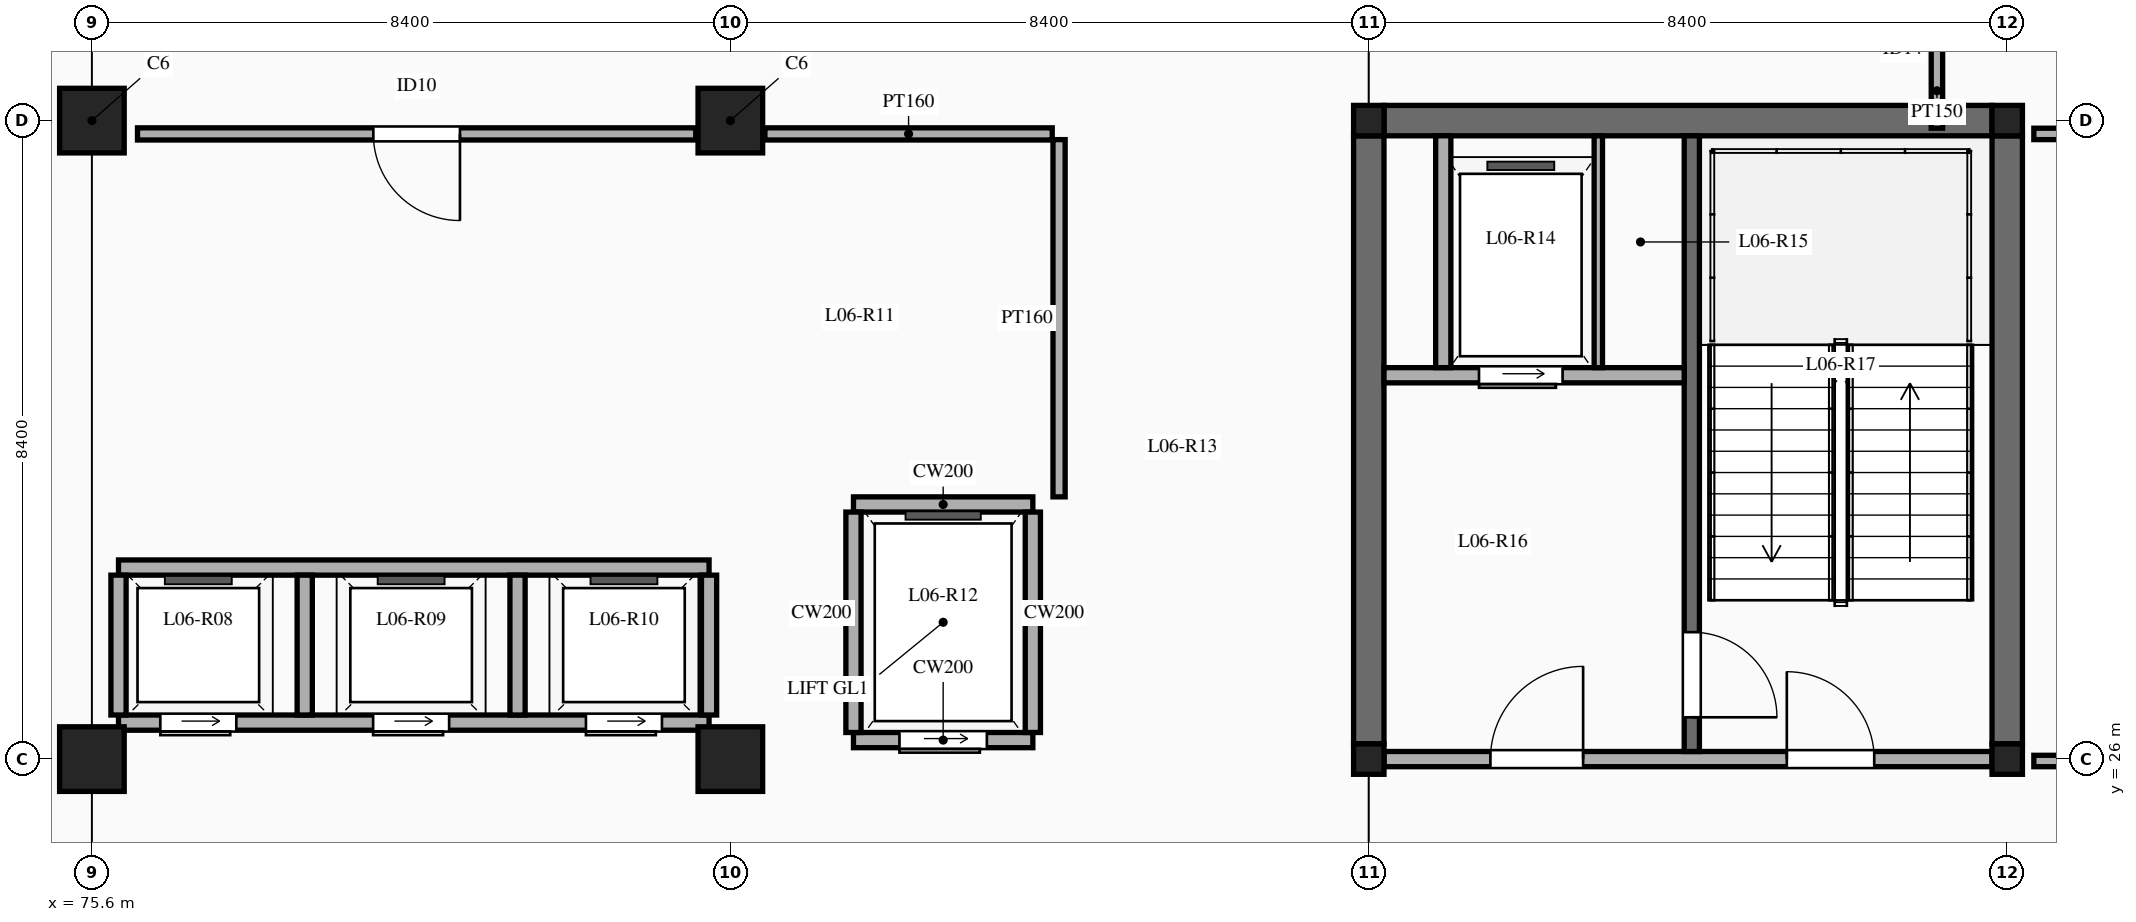
"""IFC4 building model, lengths in metres.
Left out: names, types, materials, properties, quantities, classifications, styles, units other than length and angle.
Written with IfcOpenShell. Run it as: python <this file> out.ifc"""

import sys

from ifc_helpers import new_model, si_unit, direction, frame, frame_2d, origin, origin_2d, place, context, subcontext, project, spatial, rectangle, extrude, element, fill, save


model = new_model("IFC4")
c1 = context("Model", 3, precision=1e-05, world=origin(), true_north=direction((0.0, 1.0)))
c2 = subcontext(c1, "Body", "Model", "MODEL_VIEW")
j1 = project(units=[si_unit("LENGTHUNIT", "METRE"), si_unit("PLANEANGLEUNIT", "RADIAN")], contexts=[c1])
p1 = place(None, origin())
s1 = spatial("IfcSite", under=j1, at=p1, CompositionType="ELEMENT")
p2 = place(p1, origin())
s2 = spatial("IfcBuilding", under=s1, at=p2, CompositionType="ELEMENT")
p3 = place(p2, frame((0.0, 0.0, 28.5)))
s3 = spatial("IfcBuildingStorey", under=s2, at=p3, CompositionType="ELEMENT", Elevation=28.5)
for number, where, z_axis, x_axis in (
    (1, (75.6, 26.0, 0.0), (0.0, 0.0, 1.0), (1.0, 0.0, 0.0)),
    (2, (75.6, 34.4, 0.0), (0.0, 0.0, 1.0), (1.0, 0.0, 0.0)),
    (3, (84.0, 26.0, 0.0), (0.0, 0.0, 1.0), (1.0, 0.0, 0.0)),
    (4, (84.0, 34.4, 0.0), (0.0, 0.0, 1.0), (1.0, 0.0, 0.0)),
):
    element("IfcColumn", number, at=place(p3, frame(where, z_axis=z_axis, x_axis=x_axis)), inside=s3, PredefinedType="COLUMN", context=c2, shape_type="SweptSolid", body=[
        extrude(rectangle(XDim=0.85, YDim=0.85, at=origin_2d()), origin(), (0.0, 0.0, 1.0), 4.5),
    ])
for number, where, z_axis, x_axis in (
    (5, (92.4, 26.0, 0.0), (0.0, 0.0, 1.0), (1.0, 0.0, 0.0)),
    (6, (92.4, 34.4, 0.0), (0.0, 0.0, 1.0), (1.0, 0.0, 0.0)),
    (7, (100.8, 26.0, 0.0), (0.0, 0.0, 1.0), (1.0, 0.0, 0.0)),
    (8, (100.8, 34.4, 0.0), (0.0, 0.0, 1.0), (1.0, 0.0, 0.0)),
):
    element("IfcColumn", number, at=place(p3, frame(where, z_axis=z_axis, x_axis=x_axis)), inside=s3, PredefinedType="COLUMN", context=c2, shape_type="SweptSolid", body=[
        extrude(rectangle(XDim=0.4, YDim=0.4, at=origin_2d()), origin(), (0.0, 0.0, 1.0), 4.5),
    ])
for number, where, z_axis, x_axis in (
    (9, (92.4, 26.2, 0.0), (0.0, 0.0, 1.0), (0.0, 1.0, 0.0)),
    (10, (100.8, 26.2, 0.0), (0.0, 0.0, 1.0), (0.0, 1.0, 0.0)),
    (11, (92.6, 34.4, 0.0), (0.0, 0.0, 1.0), (1.0, 0.0, 0.0)),
):
    element("IfcWall", number, at=place(p3, frame(where, z_axis=z_axis, x_axis=x_axis)), inside=s3, PredefinedType="SHEAR", context=c2, shape_type="SweptSolid", body=[
        extrude(rectangle(XDim=8.0, YDim=0.4, at=frame_2d((4.0, 0.0))), origin(), (0.0, 0.0, 1.0), 4.5),
    ])
p4 = place(p3, frame((92.6, 26.0, 0.0), z_axis=(0.0, 0.0, 1.0), x_axis=(1.0, 0.0, 0.0)))
e12 = element("IfcWall", 12, at=p4, inside=s3, PredefinedType="SOLIDWALL", context=c2, shape_type="SweptSolid", body=[
    extrude(rectangle(XDim=8.0, YDim=0.2, at=frame_2d((4.0, 0.0))), origin(), (0.0, 0.0, 1.0), 3.78),
])
p5 = place(p4, frame((1.4, 0.0, 0.0)))
e13 = element("IfcOpeningElement", 13, at=p5, cuts=e12, PredefinedType="OPENING", context=c2, shape_type="SweptSolid", body=[
    extrude(rectangle(XDim=1.22, YDim=2.15, at=frame_2d((0.61, 1.075))), frame((0.0, 0.11, 0.0), z_axis=(0.0, -1.0, 0.0), x_axis=(1.0, 0.0, 0.0)), (0.0, 0.0, 1.0), 0.22),
])
p6 = place(p4, frame((5.3, 0.0, 0.0)))
e14 = element("IfcOpeningElement", 14, at=p6, cuts=e12, PredefinedType="OPENING", context=c2, shape_type="SweptSolid", body=[
    extrude(rectangle(XDim=1.15, YDim=2.15, at=frame_2d((0.575, 1.075))), frame((0.0, 0.11, 0.0), z_axis=(0.0, -1.0, 0.0), x_axis=(1.0, 0.0, 0.0)), (0.0, 0.0, 1.0), 0.22),
])
p7 = place(p3, frame((96.65, 26.1, 0.0), z_axis=(0.0, 0.0, 1.0), x_axis=(0.0, 1.0, 0.0)))
e15 = element("IfcWall", 15, at=p7, inside=s3, PredefinedType="SOLIDWALL", context=c2, shape_type="SweptSolid", body=[
    extrude(rectangle(XDim=8.1, YDim=0.2, at=frame_2d((4.05, 0.0))), origin(), (0.0, 0.0, 1.0), 4.3),
])
p8 = place(p7, frame((0.45, 0.0, 0.0)))
e16 = element("IfcOpeningElement", 16, at=p8, cuts=e15, PredefinedType="OPENING", context=c2, shape_type="SweptSolid", body=[
    extrude(rectangle(XDim=1.12, YDim=2.15, at=frame_2d((0.56, 1.075))), frame((0.0, 0.11, 0.0), z_axis=(0.0, -1.0, 0.0), x_axis=(1.0, 0.0, 0.0)), (0.0, 0.0, 1.0), 0.22),
])
p9 = place(p3, frame((92.6, 31.05, 0.0), z_axis=(0.0, 0.0, 1.0), x_axis=(1.0, 0.0, 0.0)))
e17 = element("IfcWall", 17, at=p9, inside=s3, PredefinedType="SOLIDWALL", context=c2, shape_type="SweptSolid", body=[
    extrude(rectangle(XDim=3.95, YDim=0.2, at=frame_2d((1.975, 0.0))), origin(), (0.0, 0.0, 1.0), 4.3),
])
p10 = place(p9, frame((1.25, 0.0, 0.0)))
e18 = element("IfcOpeningElement", 18, at=p10, cuts=e17, PredefinedType="OPENING", context=c2, shape_type="SweptSolid", body=[
    extrude(rectangle(XDim=1.1, YDim=2.15, at=frame_2d((0.55, 1.075))), frame((0.0, 0.11, 0.0), z_axis=(0.0, -1.0, 0.0), x_axis=(1.0, 0.0, 0.0)), (0.0, 0.0, 1.0), 0.22),
])
p11 = place(p3, frame((95.42, 31.15, 0.0), z_axis=(0.0, 0.0, 1.0), x_axis=(0.0, 1.0, 0.0)))
e19 = element("IfcWall", 19, at=p11, inside=s3, PredefinedType="PARTITIONING", context=c2, shape_type="SweptSolid", body=[
    extrude(rectangle(XDim=3.05, YDim=0.11, at=frame_2d((1.525, 0.0))), origin(), (0.0, 0.0, 1.0), 4.3),
])
p12 = place(p3, frame((93.38, 31.15, 0.0), z_axis=(0.0, 0.0, 1.0), x_axis=(0.0, 1.0, 0.0)))
e20 = element("IfcWall", 20, at=p12, inside=s3, PredefinedType="SOLIDWALL", context=c2, shape_type="SweptSolid", body=[
    extrude(rectangle(XDim=3.05, YDim=0.2, at=frame_2d((1.525, 0.0))), origin(), (0.0, 0.0, 1.0), 4.3),
])
p13 = place(p3, frame((75.95, 26.48, 0.0), z_axis=(0.0, 0.0, 1.0), x_axis=(1.0, 0.0, 0.0)))
e21 = element("IfcWall", 21, at=p13, inside=s3, PredefinedType="SOLIDWALL", context=c2, shape_type="SweptSolid", body=[
    extrude(rectangle(XDim=7.77, YDim=0.2, at=frame_2d((3.885, 0.0))), origin(), (0.0, 0.0, 1.0), 4.3),
])
p14 = place(p13, frame((0.55, 0.0, 0.0)))
e22 = element("IfcOpeningElement", 22, at=p14, cuts=e21, PredefinedType="OPENING", context=c2, shape_type="SweptSolid", body=[
    extrude(rectangle(XDim=1.0, YDim=2.15, at=frame_2d((0.5, 1.075))), frame((0.0, 0.11, 0.0), z_axis=(0.0, -1.0, 0.0), x_axis=(1.0, 0.0, 0.0)), (0.0, 0.0, 1.0), 0.22),
])
p15 = place(p13, frame((3.35, 0.0, 0.0)))
e23 = element("IfcOpeningElement", 23, at=p15, cuts=e21, PredefinedType="OPENING", context=c2, shape_type="SweptSolid", body=[
    extrude(rectangle(XDim=1.0, YDim=2.15, at=frame_2d((0.5, 1.075))), frame((0.0, 0.11, 0.0), z_axis=(0.0, -1.0, 0.0), x_axis=(1.0, 0.0, 0.0)), (0.0, 0.0, 1.0), 0.22),
])
p16 = place(p13, frame((6.15, 0.0, 0.0)))
e24 = element("IfcOpeningElement", 24, at=p16, cuts=e21, PredefinedType="OPENING", context=c2, shape_type="SweptSolid", body=[
    extrude(rectangle(XDim=1.0, YDim=2.15, at=frame_2d((0.5, 1.075))), frame((0.0, 0.11, 0.0), z_axis=(0.0, -1.0, 0.0), x_axis=(1.0, 0.0, 0.0)), (0.0, 0.0, 1.0), 0.22),
])
p17 = place(p3, frame((75.95, 28.52, 0.0), z_axis=(0.0, 0.0, 1.0), x_axis=(1.0, 0.0, 0.0)))
e25 = element("IfcWall", 25, at=p17, inside=s3, PredefinedType="SOLIDWALL", context=c2, shape_type="SweptSolid", body=[
    extrude(rectangle(XDim=7.77, YDim=0.2, at=frame_2d((3.885, 0.0))), origin(), (0.0, 0.0, 1.0), 4.3),
])
p18 = place(p3, frame((75.95, 26.58, 0.0), z_axis=(0.0, 0.0, 1.0), x_axis=(0.0, 1.0, 0.0)))
e26 = element("IfcWall", 26, at=p18, inside=s3, PredefinedType="SOLIDWALL", context=c2, shape_type="SweptSolid", body=[
    extrude(rectangle(XDim=1.84, YDim=0.2, at=frame_2d((0.92, 0.0))), origin(), (0.0, 0.0, 1.0), 3.88),
])
for number, where, z_axis, x_axis in (
    (27, (78.4, 26.58, 0.0), (0.0, 0.0, 1.0), (0.0, 1.0, 0.0)),
    (28, (81.2, 26.58, 0.0), (0.0, 0.0, 1.0), (0.0, 1.0, 0.0)),
):
    element("IfcWall", number, at=place(p3, frame(where, z_axis=z_axis, x_axis=x_axis)), inside=s3, PredefinedType="SOLIDWALL", context=c2, shape_type="SweptSolid", body=[
        extrude(rectangle(XDim=1.84, YDim=0.2, at=frame_2d((0.92, 0.0))), origin(), (0.0, 0.0, 1.0), 4.3),
    ])
p19 = place(p3, frame((83.72, 26.58, 0.0), z_axis=(0.0, 0.0, 1.0), x_axis=(0.0, 1.0, 0.0)))
e29 = element("IfcWall", 29, at=p19, inside=s3, PredefinedType="SOLIDWALL", context=c2, shape_type="SweptSolid", body=[
    extrude(rectangle(XDim=1.84, YDim=0.2, at=frame_2d((0.92, 0.0))), origin(), (0.0, 0.0, 1.0), 3.88),
])
p20 = place(p3, frame((85.62, 26.25, 0.0), z_axis=(0.0, 0.0, 1.0), x_axis=(1.0, 0.0, 0.0)))
e30 = element("IfcWall", 30, at=p20, inside=s3, PredefinedType="SOLIDWALL", context=c2, shape_type="SweptSolid", body=[
    extrude(rectangle(XDim=2.36, YDim=0.2, at=frame_2d((1.18, 0.0))), origin(), (0.0, 0.0, 1.0), 3.78),
])
p21 = place(p20, frame((0.605, 0.0, 0.0)))
e31 = element("IfcOpeningElement", 31, at=p21, cuts=e30, PredefinedType="OPENING", context=c2, shape_type="SweptSolid", body=[
    extrude(rectangle(XDim=1.15, YDim=2.2, at=frame_2d((0.575, 1.1))), frame((0.0, 0.11, 0.0), z_axis=(0.0, -1.0, 0.0), x_axis=(1.0, 0.0, 0.0)), (0.0, 0.0, 1.0), 0.22),
])
p22 = place(p3, frame((85.62, 29.35, 0.0), z_axis=(0.0, 0.0, 1.0), x_axis=(1.0, 0.0, 0.0)))
e32 = element("IfcWall", 32, at=p22, inside=s3, PredefinedType="SOLIDWALL", context=c2, shape_type="SweptSolid", body=[
    extrude(rectangle(XDim=2.36, YDim=0.2, at=frame_2d((1.18, 0.0))), origin(), (0.0, 0.0, 1.0), 4.3),
])
p23 = place(p3, frame((85.62, 26.35, 0.0), z_axis=(0.0, 0.0, 1.0), x_axis=(0.0, 1.0, 0.0)))
e33 = element("IfcWall", 33, at=p23, inside=s3, PredefinedType="SOLIDWALL", context=c2, shape_type="SweptSolid", body=[
    extrude(rectangle(XDim=2.9, YDim=0.2, at=frame_2d((1.45, 0.0))), origin(), (0.0, 0.0, 1.0), 4.3),
])
p24 = place(p3, frame((87.98, 26.35, 0.0), z_axis=(0.0, 0.0, 1.0), x_axis=(0.0, 1.0, 0.0)))
e34 = element("IfcWall", 34, at=p24, inside=s3, PredefinedType="SOLIDWALL", context=c2, shape_type="SweptSolid", body=[
    extrude(rectangle(XDim=2.9, YDim=0.2, at=frame_2d((1.45, 0.0))), origin(), (0.0, 0.0, 1.0), 3.98),
])
p25 = place(p3, frame((88.325, 29.45, 0.0), z_axis=(0.0, 0.0, 1.0), x_axis=(0.0, 1.0, 0.0)))
e35 = element("IfcWall", 35, at=p25, inside=s3, PredefinedType="PARTITIONING", context=c2, shape_type="SweptSolid", body=[
    extrude(rectangle(XDim=4.7, YDim=0.16, at=frame_2d((2.35, 0.0))), origin(), (0.0, 0.0, 1.0), 3.45),
])
p26 = place(p3, frame((76.2, 34.225, 0.0), z_axis=(0.0, 0.0, 1.0), x_axis=(1.0, 0.0, 0.0)))
e36 = element("IfcWall", 36, at=p26, inside=s3, PredefinedType="PARTITIONING", context=c2, shape_type="SweptSolid", body=[
    extrude(rectangle(XDim=7.345, YDim=0.16, at=frame_2d((3.672, 0.0))), origin(), (0.0, 0.0, 1.0), 3.45),
])
p27 = place(p26, frame((3.103, 0.0, 0.0)))
e37 = element("IfcOpeningElement", 37, at=p27, cuts=e36, PredefinedType="OPENING", context=c2, shape_type="SweptSolid", body=[
    extrude(rectangle(XDim=1.14, YDim=2.22, at=frame_2d((0.57, 1.11))), frame((0.0, 0.09, 0.0), z_axis=(0.0, -1.0, 0.0), x_axis=(1.0, 0.0, 0.0)), (0.0, 0.0, 1.0), 0.18),
])
p28 = place(p3, frame((84.455, 34.225, 0.0), z_axis=(0.0, 0.0, 1.0), x_axis=(1.0, 0.0, 0.0)))
e38 = element("IfcWall", 38, at=p28, inside=s3, PredefinedType="PARTITIONING", context=c2, shape_type="SweptSolid", body=[
    extrude(rectangle(XDim=3.78, YDim=0.16, at=frame_2d((1.89, 0.0))), origin(), (0.0, 0.0, 1.0), 3.45),
])
p29 = place(p3, frame((101.15, 25.975, 0.0), z_axis=(0.0, 0.0, 1.0), x_axis=(1.0, 0.0, 0.0)))
e39 = element("IfcWall", 39, at=p29, inside=s3, PredefinedType="PARTITIONING", context=c2, shape_type="SweptSolid", body=[
    extrude(rectangle(XDim=7.6, YDim=0.15, at=frame_2d((3.8, 0.0))), origin(), (0.0, 0.0, 1.0), 3.45),
])
p30 = place(p29, frame((3.28, 0.0, 0.0)))
e40 = element("IfcOpeningElement", 40, at=p30, cuts=e39, PredefinedType="OPENING", context=c2, shape_type="SweptSolid", body=[
    extrude(rectangle(XDim=1.04, YDim=2.15, at=frame_2d((0.52, 1.075))), frame((0.0, 0.085, 0.0), z_axis=(0.0, -1.0, 0.0), x_axis=(1.0, 0.0, 0.0)), (0.0, 0.0, 1.0), 0.17),
])
p31 = place(p3, frame((101.15, 34.225, 0.0), z_axis=(0.0, 0.0, 1.0), x_axis=(1.0, 0.0, 0.0)))
e41 = element("IfcWall", 41, at=p31, inside=s3, PredefinedType="PARTITIONING", context=c2, shape_type="SweptSolid", body=[
    extrude(rectangle(XDim=7.6, YDim=0.15, at=frame_2d((3.8, 0.0))), origin(), (0.0, 0.0, 1.0), 3.45),
])
p32 = place(p3, frame((99.875, 34.3, 0.0), z_axis=(0.0, 0.0, 1.0), x_axis=(0.0, 1.0, 0.0)))
e42 = element("IfcWall", 42, at=p32, inside=s3, PredefinedType="PARTITIONING", context=c2, shape_type="SweptSolid", body=[
    extrude(rectangle(XDim=2.735, YDim=0.15, at=frame_2d((1.367, 0.0))), origin(), (0.0, 0.0, 1.0), 3.45),
])
p33 = place(p32, frame((1.485, 0.0, 0.0)))
e43 = element("IfcOpeningElement", 43, at=p33, cuts=e42, PredefinedType="OPENING", context=c2, shape_type="SweptSolid", body=[
    extrude(rectangle(XDim=1.0, YDim=2.15, at=frame_2d((0.5, 1.075))), frame((0.0, 0.085, 0.0), z_axis=(0.0, -1.0, 0.0), x_axis=(1.0, 0.0, 0.0)), (0.0, 0.0, 1.0), 0.17),
])
p34 = place(p5, origin())
e44 = element("IfcDoor", 44, at=p34, inside=s3, OperationType="SINGLE_SWING_RIGHT", PredefinedType="DOOR", context=c2, shape_type="SweptSolid", body=[
    extrude(rectangle(XDim=1.22, YDim=2.15, at=frame_2d((0.61, 1.075))), frame((0.0, 0.025, 0.0), z_axis=(0.0, -1.0, 0.0), x_axis=(1.0, 0.0, 0.0)), (0.0, 0.0, 1.0), 0.05),
])
fill(e13, e44)
p35 = place(p6, origin())
e45 = element("IfcDoor", 45, at=p35, inside=s3, OperationType="SINGLE_SWING_LEFT", PredefinedType="DOOR", context=c2, shape_type="SweptSolid", body=[
    extrude(rectangle(XDim=1.15, YDim=2.15, at=frame_2d((0.575, 1.075))), frame((0.0, 0.025, 0.0), z_axis=(0.0, -1.0, 0.0), x_axis=(1.0, 0.0, 0.0)), (0.0, 0.0, 1.0), 0.05),
])
fill(e14, e45)
p36 = place(p8, frame((1.12, 0.0, 0.0), z_axis=(0.0, 0.0, 1.0), x_axis=(-1.0, 0.0, 0.0)))
e46 = element("IfcDoor", 46, at=p36, inside=s3, OperationType="SINGLE_SWING_RIGHT", PredefinedType="DOOR", context=c2, shape_type="SweptSolid", body=[
    extrude(rectangle(XDim=1.12, YDim=2.15, at=frame_2d((0.56, 1.075))), frame((0.0, 0.025, 0.0), z_axis=(0.0, -1.0, 0.0), x_axis=(1.0, 0.0, 0.0)), (0.0, 0.0, 1.0), 0.05),
])
fill(e16, e46)
p37 = place(p10, frame((1.1, 0.0, 0.0), z_axis=(0.0, 0.0, 1.0), x_axis=(-1.0, 0.0, 0.0)))
e47 = element("IfcDoor", 47, at=p37, inside=s3, OperationType="SLIDING_TO_LEFT", PredefinedType="DOOR", context=c2, shape_type="SweptSolid", body=[
    extrude(rectangle(XDim=1.1, YDim=2.15, at=frame_2d((0.55, 1.075))), frame((0.0, 0.025, 0.0), z_axis=(0.0, -1.0, 0.0), x_axis=(1.0, 0.0, 0.0)), (0.0, 0.0, 1.0), 0.05),
])
fill(e18, e47)
p38 = place(p14, frame((1.0, 0.0, 0.0), z_axis=(0.0, 0.0, 1.0), x_axis=(-1.0, 0.0, 0.0)))
e48 = element("IfcDoor", 48, at=p38, inside=s3, OperationType="SLIDING_TO_LEFT", PredefinedType="DOOR", context=c2, shape_type="SweptSolid", body=[
    extrude(rectangle(XDim=1.0, YDim=2.15, at=frame_2d((0.5, 1.075))), frame((0.0, 0.025, 0.0), z_axis=(0.0, -1.0, 0.0), x_axis=(1.0, 0.0, 0.0)), (0.0, 0.0, 1.0), 0.05),
])
fill(e22, e48)
p39 = place(p15, frame((1.0, 0.0, 0.0), z_axis=(0.0, 0.0, 1.0), x_axis=(-1.0, 0.0, 0.0)))
e49 = element("IfcDoor", 49, at=p39, inside=s3, OperationType="SLIDING_TO_LEFT", PredefinedType="DOOR", context=c2, shape_type="SweptSolid", body=[
    extrude(rectangle(XDim=1.0, YDim=2.15, at=frame_2d((0.5, 1.075))), frame((0.0, 0.025, 0.0), z_axis=(0.0, -1.0, 0.0), x_axis=(1.0, 0.0, 0.0)), (0.0, 0.0, 1.0), 0.05),
])
fill(e23, e49)
p40 = place(p16, frame((1.0, 0.0, 0.0), z_axis=(0.0, 0.0, 1.0), x_axis=(-1.0, 0.0, 0.0)))
e50 = element("IfcDoor", 50, at=p40, inside=s3, OperationType="SLIDING_TO_LEFT", PredefinedType="DOOR", context=c2, shape_type="SweptSolid", body=[
    extrude(rectangle(XDim=1.0, YDim=2.15, at=frame_2d((0.5, 1.075))), frame((0.0, 0.025, 0.0), z_axis=(0.0, -1.0, 0.0), x_axis=(1.0, 0.0, 0.0)), (0.0, 0.0, 1.0), 0.05),
])
fill(e24, e50)
p41 = place(p21, frame((1.15, 0.0, 0.0), z_axis=(0.0, 0.0, 1.0), x_axis=(-1.0, 0.0, 0.0)))
e51 = element("IfcDoor", 51, at=p41, inside=s3, OperationType="SLIDING_TO_LEFT", PredefinedType="DOOR", context=c2, shape_type="SweptSolid", body=[
    extrude(rectangle(XDim=1.15, YDim=2.2, at=frame_2d((0.575, 1.1))), frame((0.0, 0.025, 0.0), z_axis=(0.0, -1.0, 0.0), x_axis=(1.0, 0.0, 0.0)), (0.0, 0.0, 1.0), 0.05),
])
fill(e31, e51)
p42 = place(p27, frame((1.14, 0.0, 0.0), z_axis=(0.0, 0.0, 1.0), x_axis=(-1.0, 0.0, 0.0)))
e52 = element("IfcDoor", 52, at=p42, inside=s3, OperationType="SINGLE_SWING_LEFT", PredefinedType="DOOR", context=c2, shape_type="SweptSolid", body=[
    extrude(rectangle(XDim=1.14, YDim=2.22, at=frame_2d((0.57, 1.11))), frame((0.0, 0.025, 0.0), z_axis=(0.0, -1.0, 0.0), x_axis=(1.0, 0.0, 0.0)), (0.0, 0.0, 1.0), 0.05),
])
fill(e37, e52)
save(model, sys.argv[1])
